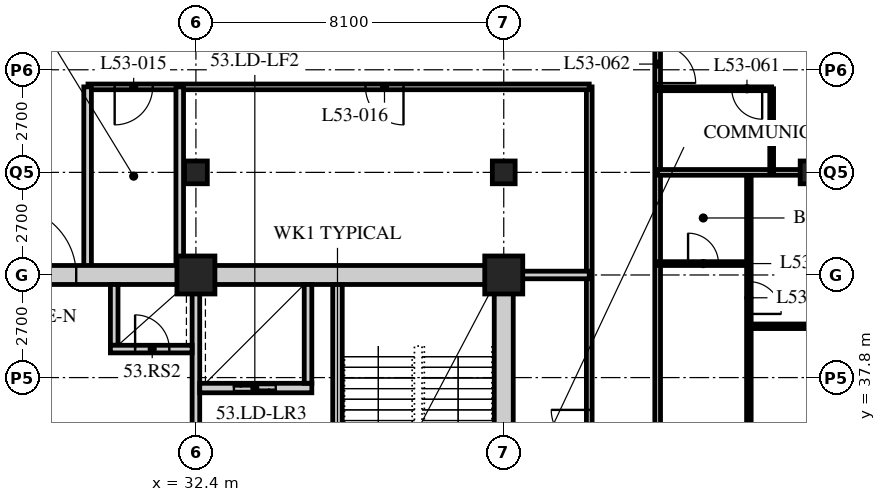
"""IFC4 building model, lengths in metres.
Left out: names, types, materials, properties, quantities, classifications, styles, units other than length and angle.
Written with IfcOpenShell. Run it as: python <this file> out.ifc"""

import sys

from ifc_helpers import new_model, si_unit, direction, frame, frame_2d, origin, origin_2d, place, context, subcontext, project, spatial, rectangle, hollow_rectangle, extrude, element, fill, save


model = new_model("IFC4")
c1 = context("Model", 3, precision=1e-05, world=origin(), true_north=direction((0.0, 1.0)))
c2 = subcontext(c1, "Body", "Model", "MODEL_VIEW")
j1 = project(units=[si_unit("LENGTHUNIT", "METRE"), si_unit("PLANEANGLEUNIT", "RADIAN")], contexts=[c1])
p1 = place(None, origin())
s1 = spatial("IfcSite", under=j1, at=p1, CompositionType="ELEMENT")
p2 = place(p1, origin())
s2 = spatial("IfcBuilding", under=s1, at=p2, CompositionType="ELEMENT")
p3 = place(p2, frame((0.0, 0.0, 206.4)))
s3 = spatial("IfcBuildingStorey", under=s2, at=p3, CompositionType="ELEMENT", Elevation=206.4)
p4 = place(p3, frame((32.4, 40.5, 0.0), z_axis=(0.0, 0.0, 1.0), x_axis=(1.0, 0.0, 0.0)))
e1 = element("IfcColumn", 1, at=p4, inside=s3, PredefinedType="COLUMN", context=c2, shape_type="SweptSolid", body=[
    extrude(hollow_rectangle(XDim=1.0, YDim=1.0, WallThickness=0.1, at=origin_2d()), origin(), (0.0, 0.0, 1.0), 3.6),
])
p5 = place(p3, frame((32.4, 43.2, 0.0), z_axis=(0.0, 0.0, 1.0), x_axis=(1.0, 0.0, 0.0)))
e2 = element("IfcColumn", 2, at=p5, inside=s3, PredefinedType="COLUMN", context=c2, shape_type="SweptSolid", body=[
    extrude(hollow_rectangle(XDim=0.6, YDim=0.6, WallThickness=0.05, at=origin_2d()), origin(), (0.0, 0.0, 1.0), 3.6),
])
p6 = place(p3, frame((40.5, 40.5, 0.0), z_axis=(0.0, 0.0, 1.0), x_axis=(1.0, 0.0, 0.0)))
e3 = element("IfcColumn", 3, at=p6, inside=s3, PredefinedType="COLUMN", context=c2, shape_type="SweptSolid", body=[
    extrude(hollow_rectangle(XDim=1.0, YDim=1.0, WallThickness=0.1, at=origin_2d()), origin(), (0.0, 0.0, 1.0), 3.6),
])
for number, where, z_axis, x_axis in (
    (4, (40.5, 43.2, 0.0), (0.0, 0.0, 1.0), (1.0, 0.0, 0.0)),
    (5, (48.6, 43.2, 0.0), (0.0, 0.0, 1.0), (1.0, 0.0, 0.0)),
):
    element("IfcColumn", number, at=place(p3, frame(where, z_axis=z_axis, x_axis=x_axis)), inside=s3, PredefinedType="COLUMN", context=c2, shape_type="SweptSolid", body=[
        extrude(hollow_rectangle(XDim=0.6, YDim=0.6, WallThickness=0.05, at=origin_2d()), origin(), (0.0, 0.0, 1.0), 3.6),
    ])
p7 = place(p3, frame((44.55, 18.9, 0.0), z_axis=(0.0, 0.0, 1.0), x_axis=(0.0, 1.0, 0.0)))
e6 = element("IfcWall", 6, at=p7, inside=s3, PredefinedType="PARTITIONING", context=c2, shape_type="SweptSolid", body=[
    extrude(rectangle(XDim=28.35, YDim=0.15, at=frame_2d((14.175, 0.0))), origin(), (0.0, 0.0, 1.0), 3.39),
])
p8 = place(p7, frame((0.4, 0.0, 0.0)))
e7 = element("IfcOpeningElement", 7, at=p8, cuts=e6, PredefinedType="OPENING", context=c2, shape_type="SweptSolid", body=[
    extrude(rectangle(XDim=1.0, YDim=2.1, at=frame_2d((0.5, 1.05))), frame((0.0, 0.085, 0.0), z_axis=(0.0, -1.0, 0.0), x_axis=(1.0, 0.0, 0.0)), (0.0, 0.0, 1.0), 0.17),
])
p9 = place(p7, frame((12.55, 0.0, 0.0)))
e8 = element("IfcOpeningElement", 8, at=p9, cuts=e6, PredefinedType="OPENING", context=c2, shape_type="SweptSolid", body=[
    extrude(rectangle(XDim=1.0, YDim=2.1, at=frame_2d((0.5, 1.05))), frame((0.0, 0.085, 0.0), z_axis=(0.0, -1.0, 0.0), x_axis=(1.0, 0.0, 0.0)), (0.0, 0.0, 1.0), 0.17),
])
p10 = place(p7, frame((26.65, 0.0, 0.0)))
e9 = element("IfcOpeningElement", 9, at=p10, cuts=e6, PredefinedType="OPENING", context=c2, shape_type="SweptSolid", body=[
    extrude(rectangle(XDim=1.0, YDim=2.1, at=frame_2d((0.5, 1.05))), frame((0.0, 0.085, 0.0), z_axis=(0.0, -1.0, 0.0), x_axis=(1.0, 0.0, 0.0)), (0.0, 0.0, 1.0), 0.17),
])
p11 = place(p3, frame((42.75, 20.7, 0.0), z_axis=(0.0, 0.0, 1.0), x_axis=(0.0, 1.0, 0.0)))
e10 = element("IfcWall", 10, at=p11, inside=s3, PredefinedType="PARTITIONING", context=c2, shape_type="SweptSolid", body=[
    extrude(rectangle(XDim=24.75, YDim=0.15, at=frame_2d((12.375, 0.0))), origin(), (0.0, 0.0, 1.0), 3.39),
])
p12 = place(p11, frame((7.15, 0.0, 0.0)))
e11 = element("IfcOpeningElement", 11, at=p12, cuts=e10, PredefinedType="OPENING", context=c2, shape_type="SweptSolid", body=[
    extrude(rectangle(XDim=1.0, YDim=2.1, at=frame_2d((0.5, 1.05))), frame((0.0, 0.085, 0.0), z_axis=(0.0, -1.0, 0.0), x_axis=(1.0, 0.0, 0.0)), (0.0, 0.0, 1.0), 0.17),
])
p13 = place(p11, frame((15.25, 0.0, 0.0)))
e12 = element("IfcOpeningElement", 12, at=p13, cuts=e10, PredefinedType="OPENING", context=c2, shape_type="SweptSolid", body=[
    extrude(rectangle(XDim=1.0, YDim=2.1, at=frame_2d((0.5, 1.05))), frame((0.0, 0.085, 0.0), z_axis=(0.0, -1.0, 0.0), x_axis=(1.0, 0.0, 0.0)), (0.0, 0.0, 1.0), 0.17),
])
p14 = place(p3, frame((42.75, 45.45, 0.0), z_axis=(0.0, 0.0, 1.0), x_axis=(-1.0, 0.0, 0.0)))
e13 = element("IfcWall", 13, at=p14, inside=s3, PredefinedType="PARTITIONING", context=c2, shape_type="SweptSolid", body=[
    extrude(rectangle(XDim=13.19, YDim=0.15, at=frame_2d((6.595, 0.0))), origin(), (0.0, 0.0, 1.0), 3.39),
])
p15 = place(p14, frame((11.488, 0.0, 0.0)))
e14 = element("IfcOpeningElement", 14, at=p15, cuts=e13, PredefinedType="OPENING", context=c2, shape_type="SweptSolid", body=[
    extrude(rectangle(XDim=1.0, YDim=2.1, at=frame_2d((0.5, 1.05))), frame((0.0, 0.085, 0.0), z_axis=(0.0, -1.0, 0.0), x_axis=(1.0, 0.0, 0.0)), (0.0, 0.0, 1.0), 0.17),
])
p16 = place(p14, frame((4.888, 0.0, 0.0)))
e15 = element("IfcOpeningElement", 15, at=p16, cuts=e13, PredefinedType="OPENING", context=c2, shape_type="SweptSolid", body=[
    extrude(rectangle(XDim=1.0, YDim=2.1, at=frame_2d((0.5, 1.05))), frame((0.0, 0.085, 0.0), z_axis=(0.0, -1.0, 0.0), x_axis=(1.0, 0.0, 0.0)), (0.0, 0.0, 1.0), 0.17),
])
p17 = place(p3, frame((31.974, 45.45, 0.0), z_axis=(0.0, 0.0, 1.0), x_axis=(0.0, -1.0, 0.0)))
e16 = element("IfcWall", 16, at=p17, inside=s3, PredefinedType="SOLIDWALL", context=c2, shape_type="SweptSolid", body=[
    extrude(rectangle(XDim=4.95, YDim=0.2, at=frame_2d((2.475, 0.0))), origin(), (0.0, 0.0, 1.0), 2.69),
])
p18 = place(p3, frame((29.55, 40.5, 0.0), z_axis=(0.0, 0.0, 1.0), x_axis=(0.0, 1.0, 0.0)))
e17 = element("IfcWall", 17, at=p18, inside=s3, PredefinedType="SOLIDWALL", context=c2, shape_type="SweptSolid", body=[
    extrude(rectangle(XDim=4.95, YDim=0.2, at=frame_2d((2.475, 0.0))), origin(), (0.0, 0.0, 1.0), 3.39),
])
p19 = place(p3, frame((40.5, 40.5, 0.0), z_axis=(0.0, 0.0, 1.0), x_axis=(1.0, 0.0, 0.0)))
e18 = element("IfcWall", 18, at=p19, inside=s3, PredefinedType="SOLIDWALL", context=c2, shape_type="SweptSolid", body=[
    extrude(rectangle(XDim=2.25, YDim=0.2, at=frame_2d((1.125, 0.0))), origin(), (0.0, 0.0, 1.0), 3.39),
])
p20 = place(p3, frame((46.95, 18.9, 0.0), z_axis=(0.0, 0.0, 1.0), x_axis=(0.0, 1.0, 0.0)))
e19 = element("IfcWall", 19, at=p20, inside=s3, PredefinedType="PARTITIONING", context=c2, shape_type="SweptSolid", body=[
    extrude(rectangle(XDim=24.3, YDim=0.12, at=frame_2d((12.15, 0.0))), origin(), (0.0, 0.0, 1.0), 3.39),
])
p21 = place(p20, frame((0.975, 0.0, 0.0)))
e20 = element("IfcOpeningElement", 20, at=p21, cuts=e19, PredefinedType="OPENING", context=c2, shape_type="SweptSolid", body=[
    extrude(rectangle(XDim=0.85, YDim=2.1, at=frame_2d((0.425, 1.05))), frame((0.0, 0.07, 0.0), z_axis=(0.0, -1.0, 0.0), x_axis=(1.0, 0.0, 0.0)), (0.0, 0.0, 1.0), 0.14),
])
p22 = place(p20, frame((8.425, 0.0, 0.0)))
e21 = element("IfcOpeningElement", 21, at=p22, cuts=e19, PredefinedType="OPENING", context=c2, shape_type="SweptSolid", body=[
    extrude(rectangle(XDim=0.85, YDim=2.1, at=frame_2d((0.425, 1.05))), frame((0.0, 0.07, 0.0), z_axis=(0.0, -1.0, 0.0), x_axis=(1.0, 0.0, 0.0)), (0.0, 0.0, 1.0), 0.14),
])
p23 = place(p20, frame((13.125, 0.0, 0.0)))
e22 = element("IfcOpeningElement", 22, at=p23, cuts=e19, PredefinedType="OPENING", context=c2, shape_type="SweptSolid", body=[
    extrude(rectangle(XDim=0.85, YDim=2.1, at=frame_2d((0.425, 1.05))), frame((0.0, 0.07, 0.0), z_axis=(0.0, -1.0, 0.0), x_axis=(1.0, 0.0, 0.0)), (0.0, 0.0, 1.0), 0.14),
])
p24 = place(p20, frame((20.575, 0.0, 0.0)))
e23 = element("IfcOpeningElement", 23, at=p24, cuts=e19, PredefinedType="OPENING", context=c2, shape_type="SweptSolid", body=[
    extrude(rectangle(XDim=0.85, YDim=2.1, at=frame_2d((0.425, 1.05))), frame((0.0, 0.07, 0.0), z_axis=(0.0, -1.0, 0.0), x_axis=(1.0, 0.0, 0.0)), (0.0, 0.0, 1.0), 0.14),
])
p25 = place(p3, frame((44.55, 40.8, 0.0), z_axis=(0.0, 0.0, 1.0), x_axis=(1.0, 0.0, 0.0)))
e24 = element("IfcWall", 24, at=p25, inside=s3, PredefinedType="PARTITIONING", context=c2, shape_type="SweptSolid", body=[
    extrude(rectangle(XDim=2.4, YDim=0.1, at=frame_2d((1.2, 0.0))), origin(), (0.0, 0.0, 1.0), 3.39),
])
p26 = place(p25, frame((0.8, 0.0, 0.0)))
e25 = element("IfcOpeningElement", 25, at=p26, cuts=e24, PredefinedType="OPENING", context=c2, shape_type="SweptSolid", body=[
    extrude(rectangle(XDim=0.8, YDim=2.1, at=frame_2d((0.4, 1.05))), frame((0.0, 0.06, 0.0), z_axis=(0.0, -1.0, 0.0), x_axis=(1.0, 0.0, 0.0)), (0.0, 0.0, 1.0), 0.12),
])
p27 = place(p3, frame((46.95, 39.15, 0.0), z_axis=(0.0, 0.0, 1.0), x_axis=(1.0, 0.0, 0.0)))
e26 = element("IfcWall", 26, at=p27, inside=s3, PredefinedType="PARTITIONING", context=c2, shape_type="SweptSolid", body=[
    extrude(rectangle(XDim=9.45, YDim=0.12, at=frame_2d((4.725, 0.0))), origin(), (0.0, 0.0, 1.0), 3.39),
])
p28 = place(p3, frame((44.55, 43.2, 0.0), z_axis=(0.0, 0.0, 1.0), x_axis=(1.0, 0.0, 0.0)))
e27 = element("IfcWall", 27, at=p28, inside=s3, PredefinedType="PARTITIONING", context=c2, shape_type="SweptSolid", body=[
    extrude(rectangle(XDim=11.85, YDim=0.15, at=frame_2d((5.925, 0.0))), origin(), (0.0, 0.0, 1.0), 2.778),
])
p29 = place(p3, frame((47.55, 43.2, 0.0), z_axis=(0.0, 0.0, 1.0), x_axis=(0.0, 1.0, 0.0)))
e28 = element("IfcWall", 28, at=p29, inside=s3, PredefinedType="PARTITIONING", context=c2, shape_type="SweptSolid", body=[
    extrude(rectangle(XDim=2.2, YDim=0.1, at=frame_2d((1.1, 0.0))), origin(), (0.0, 0.0, 1.0), 3.39),
])
p30 = place(p3, frame((44.55, 45.4, 0.0), z_axis=(0.0, 0.0, 1.0), x_axis=(1.0, 0.0, 0.0)))
e29 = element("IfcWall", 29, at=p30, inside=s3, PredefinedType="PARTITIONING", context=c2, shape_type="SweptSolid", body=[
    extrude(rectangle(XDim=3.0, YDim=0.1, at=frame_2d((1.5, 0.0))), origin(), (0.0, 0.0, 1.0), 3.39),
])
p31 = place(p30, frame((1.95, 0.0, 0.0)))
e30 = element("IfcOpeningElement", 30, at=p31, cuts=e29, PredefinedType="OPENING", context=c2, shape_type="SweptSolid", body=[
    extrude(rectangle(XDim=0.8, YDim=2.1, at=frame_2d((0.4, 1.05))), frame((0.0, 0.06, 0.0), z_axis=(0.0, -1.0, 0.0), x_axis=(1.0, 0.0, 0.0)), (0.0, 0.0, 1.0), 0.12),
])
p32 = place(p3, frame((15.95, 40.5, 0.0), z_axis=(0.0, 0.0, 1.0), x_axis=(1.0, 0.0, 0.0)))
e31 = element("IfcWall", 31, at=p32, inside=s3, PredefinedType="SOLIDWALL", context=c2, shape_type="SweptSolid", body=[
    extrude(rectangle(XDim=24.8, YDim=0.5, at=frame_2d((12.4, 0.0))), origin(), (0.0, 0.0, 1.0), 2.74),
])
p33 = place(p32, frame((11.5, 0.0, 0.0)))
e32 = element("IfcOpeningElement", 32, at=p33, cuts=e31, PredefinedType="OPENING", context=c2, shape_type="SweptSolid", body=[
    extrude(rectangle(XDim=1.8, YDim=2.4, at=frame_2d((0.9, 1.2))), frame((0.0, 0.26, 0.0), z_axis=(0.0, -1.0, 0.0), x_axis=(1.0, 0.0, 0.0)), (0.0, 0.0, 1.0), 0.52),
])
p34 = place(p3, frame((40.5, 24.55, 0.0), z_axis=(0.0, 0.0, 1.0), x_axis=(0.0, 1.0, 0.0)))
e33 = element("IfcWall", 33, at=p34, inside=s3, PredefinedType="SOLIDWALL", context=c2, shape_type="SweptSolid", body=[
    extrude(rectangle(XDim=15.7, YDim=0.5, at=frame_2d((7.85, 0.0))), origin(), (0.0, 0.0, 1.0), 2.778),
])
p35 = place(p3, frame((32.4, 32.5, 0.0), z_axis=(0.0, 0.0, 1.0), x_axis=(0.0, 1.0, 0.0)))
e34 = element("IfcWall", 34, at=p35, inside=s3, PredefinedType="SOLIDWALL", context=c2, shape_type="SweptSolid", body=[
    extrude(rectangle(XDim=7.75, YDim=0.2, at=frame_2d((3.875, 0.0))), origin(), (0.0, 0.0, 1.0), 2.778),
])
p36 = place(p35, frame((1.9, 0.0, 0.0)))
e35 = element("IfcOpeningElement", 35, at=p36, cuts=e34, PredefinedType="OPENING", context=c2, shape_type="SweptSolid", body=[
    extrude(rectangle(XDim=1.2, YDim=2.1, at=frame_2d((0.6, 1.05))), frame((0.0, 0.11, 0.0), z_axis=(0.0, -1.0, 0.0), x_axis=(1.0, 0.0, 0.0)), (0.0, 0.0, 1.0), 0.22),
])
p37 = place(p3, frame((36.125, 32.5, 0.0), z_axis=(0.0, 0.0, 1.0), x_axis=(0.0, 1.0, 0.0)))
e36 = element("IfcWall", 36, at=p37, inside=s3, PredefinedType="SOLIDWALL", context=c2, shape_type="SweptSolid", body=[
    extrude(rectangle(XDim=7.75, YDim=0.25, at=frame_2d((3.875, 0.0))), origin(), (0.0, 0.0, 1.0), 3.39),
])
p38 = place(p37, frame((0.45, 0.0, 0.0)))
e37 = element("IfcOpeningElement", 37, at=p38, cuts=e36, PredefinedType="OPENING", context=c2, shape_type="SweptSolid", body=[
    extrude(rectangle(XDim=1.2, YDim=2.1, at=frame_2d((0.6, 1.05))), frame((0.0, 0.135, 0.0), z_axis=(0.0, -1.0, 0.0), x_axis=(1.0, 0.0, 0.0)), (0.0, 0.0, 1.0), 0.27),
])
p39 = place(p3, frame((32.5, 37.525, 0.0), z_axis=(0.0, 0.0, 1.0), x_axis=(1.0, 0.0, 0.0)))
e38 = element("IfcWall", 38, at=p39, inside=s3, PredefinedType="SOLIDWALL", context=c2, shape_type="SweptSolid", body=[
    extrude(rectangle(XDim=2.95, YDim=0.25, at=frame_2d((1.475, 0.0))), origin(), (0.0, 0.0, 1.0), 3.39),
])
p40 = place(p39, frame((0.9, 0.0, 0.0)))
e39 = element("IfcOpeningElement", 39, at=p40, cuts=e38, PredefinedType="OPENING", context=c2, shape_type="SweptSolid", body=[
    extrude(rectangle(XDim=1.1, YDim=2.4, at=frame_2d((0.55, 1.2))), frame((0.0, 0.135, 0.0), z_axis=(0.0, -1.0, 0.0), x_axis=(1.0, 0.0, 0.0)), (0.0, 0.0, 1.0), 0.27),
])
p41 = place(p3, frame((35.35, 37.65, 0.0), z_axis=(0.0, 0.0, 1.0), x_axis=(0.0, 1.0, 0.0)))
e40 = element("IfcWall", 40, at=p41, inside=s3, PredefinedType="SOLIDWALL", context=c2, shape_type="SweptSolid", body=[
    extrude(rectangle(XDim=2.6, YDim=0.2, at=frame_2d((1.3, 0.0))), origin(), (0.0, 0.0, 1.0), 3.39),
])
p42 = place(p3, frame((30.25, 38.65, 0.0), z_axis=(0.0, 0.0, 1.0), x_axis=(0.0, 1.0, 0.0)))
e41 = element("IfcWall", 41, at=p42, inside=s3, PredefinedType="SOLIDWALL", context=c2, shape_type="SweptSolid", body=[
    extrude(rectangle(XDim=1.6, YDim=0.2, at=frame_2d((0.8, 0.0))), origin(), (0.0, 0.0, 1.0), 3.39),
])
p43 = place(p3, frame((30.15, 38.55, 0.0), z_axis=(0.0, 0.0, 1.0), x_axis=(1.0, 0.0, 0.0)))
e42 = element("IfcWall", 42, at=p43, inside=s3, PredefinedType="SOLIDWALL", context=c2, shape_type="SweptSolid", body=[
    extrude(rectangle(XDim=2.15, YDim=0.2, at=frame_2d((1.075, 0.0))), origin(), (0.0, 0.0, 1.0), 3.39),
])
p44 = place(p43, frame((0.65, 0.0, 0.0)))
e43 = element("IfcOpeningElement", 43, at=p44, cuts=e42, PredefinedType="OPENING", context=c2, shape_type="SweptSolid", body=[
    extrude(rectangle(XDim=0.9, YDim=2.1, at=frame_2d((0.45, 1.05))), frame((0.0, 0.11, 0.0), z_axis=(0.0, -1.0, 0.0), x_axis=(1.0, 0.0, 0.0)), (0.0, 0.0, 1.0), 0.22),
])
p45 = place(p13, origin())
e44 = element("IfcDoor", 44, at=p45, inside=s3, OperationType="SINGLE_SWING_RIGHT", PredefinedType="DOOR", context=c2, shape_type="SweptSolid", body=[
    extrude(rectangle(XDim=1.0, YDim=2.1, at=frame_2d((0.5, 1.05))), frame((0.0, 0.025, 0.0), z_axis=(0.0, -1.0, 0.0), x_axis=(1.0, 0.0, 0.0)), (0.0, 0.0, 1.0), 0.05),
])
fill(e12, e44)
p46 = place(p15, origin())
e45 = element("IfcDoor", 45, at=p46, inside=s3, OperationType="SINGLE_SWING_RIGHT", PredefinedType="DOOR", context=c2, shape_type="SweptSolid", body=[
    extrude(rectangle(XDim=1.0, YDim=2.1, at=frame_2d((0.5, 1.05))), frame((0.0, 0.025, 0.0), z_axis=(0.0, -1.0, 0.0), x_axis=(1.0, 0.0, 0.0)), (0.0, 0.0, 1.0), 0.05),
])
fill(e14, e45)
p47 = place(p16, origin())
e46 = element("IfcDoor", 46, at=p47, inside=s3, OperationType="SINGLE_SWING_LEFT", PredefinedType="DOOR", context=c2, shape_type="SweptSolid", body=[
    extrude(rectangle(XDim=1.0, YDim=2.1, at=frame_2d((0.5, 1.05))), frame((0.0, 0.025, 0.0), z_axis=(0.0, -1.0, 0.0), x_axis=(1.0, 0.0, 0.0)), (0.0, 0.0, 1.0), 0.05),
])
fill(e15, e46)
p48 = place(p26, origin())
e47 = element("IfcDoor", 47, at=p48, inside=s3, OperationType="SINGLE_SWING_LEFT", PredefinedType="DOOR", context=c2, shape_type="SweptSolid", body=[
    extrude(rectangle(XDim=0.8, YDim=2.1, at=frame_2d((0.4, 1.05))), frame((0.0, 0.025, 0.0), z_axis=(0.0, -1.0, 0.0), x_axis=(1.0, 0.0, 0.0)), (0.0, 0.0, 1.0), 0.05),
])
fill(e25, e47)
p49 = place(p24, origin())
e48 = element("IfcDoor", 48, at=p49, inside=s3, OperationType="SINGLE_SWING_RIGHT", PredefinedType="DOOR", context=c2, shape_type="SweptSolid", body=[
    extrude(rectangle(XDim=0.85, YDim=2.1, at=frame_2d((0.425, 1.05))), frame((0.0, 0.025, 0.0), z_axis=(0.0, -1.0, 0.0), x_axis=(1.0, 0.0, 0.0)), (0.0, 0.0, 1.0), 0.05),
])
fill(e23, e48)
p50 = place(p31, origin())
e49 = element("IfcDoor", 49, at=p50, inside=s3, OperationType="SINGLE_SWING_LEFT", PredefinedType="DOOR", context=c2, shape_type="SweptSolid", body=[
    extrude(rectangle(XDim=0.8, YDim=2.1, at=frame_2d((0.4, 1.05))), frame((0.0, 0.025, 0.0), z_axis=(0.0, -1.0, 0.0), x_axis=(1.0, 0.0, 0.0)), (0.0, 0.0, 1.0), 0.05),
])
fill(e30, e49)
p51 = place(p10, origin())
e50 = element("IfcDoor", 50, at=p51, inside=s3, OperationType="SINGLE_SWING_RIGHT", PredefinedType="DOOR", context=c2, shape_type="SweptSolid", body=[
    extrude(rectangle(XDim=1.0, YDim=2.1, at=frame_2d((0.5, 1.05))), frame((0.0, 0.025, 0.0), z_axis=(0.0, -1.0, 0.0), x_axis=(1.0, 0.0, 0.0)), (0.0, 0.0, 1.0), 0.05),
])
fill(e9, e50)
p52 = place(p44, origin())
e51 = element("IfcDoor", 51, at=p52, inside=s3, OperationType="SINGLE_SWING_LEFT", PredefinedType="DOOR", context=c2, shape_type="SweptSolid", body=[
    extrude(rectangle(XDim=0.9, YDim=2.1, at=frame_2d((0.45, 1.05))), frame((0.0, 0.025, 0.0), z_axis=(0.0, -1.0, 0.0), x_axis=(1.0, 0.0, 0.0)), (0.0, 0.0, 1.0), 0.05),
])
fill(e43, e51)
p53 = place(p40, origin())
e52 = element("IfcDoor", 52, at=p53, inside=s3, OperationType="DOUBLE_DOOR_SLIDING", PredefinedType="DOOR", context=c2, shape_type="SweptSolid", body=[
    extrude(rectangle(XDim=1.1, YDim=2.4, at=frame_2d((0.55, 1.2))), frame((0.0, 0.025, 0.0), z_axis=(0.0, -1.0, 0.0), x_axis=(1.0, 0.0, 0.0)), (0.0, 0.0, 1.0), 0.05),
])
fill(e39, e52)
p54 = place(p33, origin())
e53 = element("IfcDoor", 53, at=p54, inside=s3, OperationType="DOUBLE_DOOR_SINGLE_SWING", PredefinedType="DOOR", context=c2, shape_type="SweptSolid", body=[
    extrude(rectangle(XDim=1.8, YDim=2.4, at=frame_2d((0.9, 1.2))), frame((0.0, 0.025, 0.0), z_axis=(0.0, -1.0, 0.0), x_axis=(1.0, 0.0, 0.0)), (0.0, 0.0, 1.0), 0.05),
])
fill(e32, e53)
save(model, sys.argv[1])
